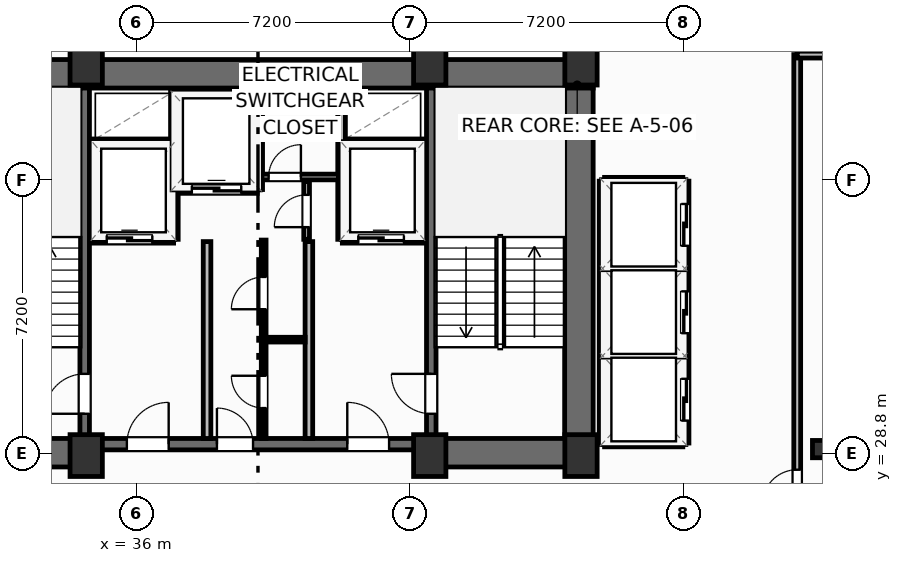
"""IFC4 building model, lengths in metres.
Left out: names, types, materials, properties, quantities, classifications, styles, units other than length and angle.
Written with IfcOpenShell. Run it as: python <this file> out.ifc"""

import sys

from ifc_helpers import new_model, si_unit, direction, frame, frame_2d, origin, origin_2d, place, context, subcontext, project, spatial, rectangle, i_section, extrude, element, fill, save


model = new_model("IFC4")
c1 = context("Model", 3, precision=1e-05, world=origin(), true_north=direction((0.0, 1.0)))
c2 = subcontext(c1, "Body", "Model", "MODEL_VIEW")
j1 = project(units=[si_unit("LENGTHUNIT", "METRE"), si_unit("PLANEANGLEUNIT", "RADIAN")], contexts=[c1])
p1 = place(None, origin())
s1 = spatial("IfcSite", under=j1, at=p1, CompositionType="ELEMENT")
p2 = place(p1, origin())
s2 = spatial("IfcBuilding", under=s1, at=p2, CompositionType="ELEMENT")
p3 = place(p2, frame((0.0, 0.0, 151.3)))
s3 = spatial("IfcBuildingStorey", under=s2, at=p3, CompositionType="ELEMENT", Elevation=151.3)
for number, where, z_axis, x_axis in (
    (1, (34.68, 28.75, 0.0), (0.0, 0.0, 1.0), (1.0, 0.0, 0.0)),
    (2, (43.72, 28.75, 0.0), (0.0, 0.0, 1.0), (1.0, 0.0, 0.0)),
    (3, (47.7, 28.75, 0.0), (0.0, 0.0, 1.0), (1.0, 0.0, 0.0)),
    (4, (34.68, 39.05, 0.0), (0.0, 0.0, 1.0), (1.0, 0.0, 0.0)),
    (5, (43.72, 39.05, 0.0), (0.0, 0.0, 1.0), (1.0, 0.0, 0.0)),
    (6, (47.7, 39.05, 0.0), (0.0, 0.0, 1.0), (1.0, 0.0, 0.0)),
):
    element("IfcColumn", number, at=place(p3, frame(where, z_axis=z_axis, x_axis=x_axis)), inside=s3, PredefinedType="COLUMN", context=c2, shape_type="SweptSolid", body=[
        extrude(rectangle(XDim=0.85, YDim=1.1, at=origin_2d()), origin(), (0.0, 0.0, 1.0), 3.7),
    ])
p4 = place(p3, frame((54.0, 28.92, 0.0), z_axis=(0.0, 0.0, 1.0), x_axis=(1.0, 0.0, 0.0)))
e7 = element("IfcColumn", 7, at=p4, inside=s3, PredefinedType="COLUMN", context=c2, shape_type="SweptSolid", body=[
    extrude(i_section(OverallWidth=0.418, OverallDepth=0.455, WebThickness=0.042, FlangeThickness=0.068, FilletRadius=0.025, at=origin_2d()), origin(), (0.0, 0.0, 1.0), 3.7),
])
p5 = place(p3, frame((30.38, 38.795, 0.0), z_axis=(0.0, 0.0, 1.0), x_axis=(1.0, 0.0, 0.0)))
e8 = element("IfcWall", 8, at=p5, inside=s3, PredefinedType="SHEAR", context=c2, shape_type="SweptSolid", body=[
    extrude(rectangle(XDim=17.64, YDim=0.75, at=frame_2d((8.82, 0.0))), origin(), (0.0, 0.0, 1.0), 3.45),
])
p6 = place(p3, frame((47.645, 29.2, 0.0), z_axis=(0.0, 0.0, 1.0), x_axis=(0.0, 1.0, 0.0)))
e9 = element("IfcWall", 9, at=p6, inside=s3, PredefinedType="SHEAR", context=c2, shape_type="SweptSolid", body=[
    extrude(rectangle(XDim=9.22, YDim=0.75, at=frame_2d((4.61, 0.0))), origin(), (0.0, 0.0, 1.0), 3.45),
])
p7 = place(p3, frame((30.38, 28.825, 0.0), z_axis=(0.0, 0.0, 1.0), x_axis=(1.0, 0.0, 0.0)))
e10 = element("IfcWall", 10, at=p7, inside=s3, PredefinedType="SHEAR", context=c2, shape_type="SweptSolid", body=[
    extrude(rectangle(XDim=4.42, YDim=0.75, at=frame_2d((2.21, 0.0))), origin(), (0.0, 0.0, 1.0), 3.45),
])
p8 = place(p3, frame((43.6, 28.825, 0.0), z_axis=(0.0, 0.0, 1.0), x_axis=(1.0, 0.0, 0.0)))
e11 = element("IfcWall", 11, at=p8, inside=s3, PredefinedType="SHEAR", context=c2, shape_type="SweptSolid", body=[
    extrude(rectangle(XDim=4.42, YDim=0.75, at=frame_2d((2.21, 0.0))), origin(), (0.0, 0.0, 1.0), 3.45),
])
p9 = place(p3, frame((34.8, 29.05, 0.0), z_axis=(0.0, 0.0, 1.0), x_axis=(1.0, 0.0, 0.0)))
e12 = element("IfcWall", 12, at=p9, inside=s3, PredefinedType="SHEAR", context=c2, shape_type="SweptSolid", body=[
    extrude(rectangle(XDim=8.8, YDim=0.3, at=frame_2d((4.4, 0.0))), origin(), (0.0, 0.0, 1.0), 3.45),
])
p10 = place(p9, frame((0.95, 0.0, 0.0)))
e13 = element("IfcOpeningElement", 13, at=p10, cuts=e12, PredefinedType="OPENING", context=c2, shape_type="SweptSolid", body=[
    extrude(rectangle(XDim=1.1, YDim=2.15, at=frame_2d((0.55, 1.075))), frame((0.0, 0.16, 0.0), z_axis=(0.0, -1.0, 0.0), x_axis=(1.0, 0.0, 0.0)), (0.0, 0.0, 1.0), 0.32),
])
p11 = place(p9, frame((6.75, 0.0, 0.0)))
e14 = element("IfcOpeningElement", 14, at=p11, cuts=e12, PredefinedType="OPENING", context=c2, shape_type="SweptSolid", body=[
    extrude(rectangle(XDim=1.1, YDim=2.15, at=frame_2d((0.55, 1.075))), frame((0.0, 0.16, 0.0), z_axis=(0.0, -1.0, 0.0), x_axis=(1.0, 0.0, 0.0)), (0.0, 0.0, 1.0), 0.32),
])
p12 = place(p9, frame((3.32, 0.0, 0.0)))
e15 = element("IfcOpeningElement", 15, at=p12, cuts=e12, PredefinedType="OPENING", context=c2, shape_type="SweptSolid", body=[
    extrude(rectangle(XDim=0.95, YDim=2.15, at=frame_2d((0.475, 1.075))), frame((0.0, 0.16, 0.0), z_axis=(0.0, -1.0, 0.0), x_axis=(1.0, 0.0, 0.0)), (0.0, 0.0, 1.0), 0.32),
])
p13 = place(p3, frame((34.64, 29.2, 0.0), z_axis=(0.0, 0.0, 1.0), x_axis=(0.0, 1.0, 0.0)))
e16 = element("IfcWall", 16, at=p13, inside=s3, PredefinedType="SHEAR", context=c2, shape_type="SweptSolid", body=[
    extrude(rectangle(XDim=9.22, YDim=0.25, at=frame_2d((4.61, 0.0))), origin(), (0.0, 0.0, 1.0), 3.45),
])
p14 = place(p13, frame((0.65, 0.0, 0.0)))
e17 = element("IfcOpeningElement", 17, at=p14, cuts=e16, PredefinedType="OPENING", context=c2, shape_type="SweptSolid", body=[
    extrude(rectangle(XDim=1.05, YDim=2.15, at=frame_2d((0.525, 1.075))), frame((0.0, 0.135, 0.0), z_axis=(0.0, -1.0, 0.0), x_axis=(1.0, 0.0, 0.0)), (0.0, 0.0, 1.0), 0.27),
])
p15 = place(p3, frame((43.76, 29.2, 0.0), z_axis=(0.0, 0.0, 1.0), x_axis=(0.0, 1.0, 0.0)))
e18 = element("IfcWall", 18, at=p15, inside=s3, PredefinedType="SHEAR", context=c2, shape_type="SweptSolid", body=[
    extrude(rectangle(XDim=9.22, YDim=0.25, at=frame_2d((4.61, 0.0))), origin(), (0.0, 0.0, 1.0), 3.45),
])
p16 = place(p15, frame((0.65, 0.0, 0.0)))
e19 = element("IfcOpeningElement", 19, at=p16, cuts=e18, PredefinedType="OPENING", context=c2, shape_type="SweptSolid", body=[
    extrude(rectangle(XDim=1.05, YDim=2.15, at=frame_2d((0.525, 1.075))), frame((0.0, 0.135, 0.0), z_axis=(0.0, -1.0, 0.0), x_axis=(1.0, 0.0, 0.0)), (0.0, 0.0, 1.0), 0.27),
])
p17 = place(p3, frame((53.45, 39.3, 0.0), z_axis=(0.0, 0.0, 1.0), x_axis=(0.0, 1.0, 0.0)))
e20 = element("IfcWall", 20, at=p17, inside=s3, PredefinedType="PARTITIONING", context=c2, shape_type="SweptSolid", body=[
    extrude(rectangle(XDim=2.31, YDim=0.125, at=frame_2d((1.155, 0.0))), origin(), (0.0, 0.0, 1.0), 3.45),
])
p18 = place(p3, frame((53.39, 26.84, 0.0), z_axis=(0.0, 0.0, 1.0), x_axis=(0.0, 1.0, 0.0)))
e21 = element("IfcWall", 21, at=p18, inside=s3, PredefinedType="PARTITIONING", context=c2, shape_type="SweptSolid", body=[
    extrude(rectangle(XDim=12.46, YDim=0.18, at=frame_2d((6.23, 0.0))), origin(), (0.0, 0.0, 1.0), 3.45),
])
p19 = place(p18, frame((0.618, 0.0, 0.0)))
e22 = element("IfcOpeningElement", 22, at=p19, cuts=e21, PredefinedType="OPENING", context=c2, shape_type="SweptSolid", body=[
    extrude(rectangle(XDim=0.92, YDim=2.05, at=frame_2d((0.46, 1.025))), frame((0.0, 0.1, 0.0), z_axis=(0.0, -1.0, 0.0), x_axis=(1.0, 0.0, 0.0)), (0.0, 0.0, 1.0), 0.2),
])
p20 = place(p3, frame((53.39, 39.3, 0.0), z_axis=(0.0, 0.0, 1.0), x_axis=(1.0, 0.0, 0.0)))
e23 = element("IfcWall", 23, at=p20, inside=s3, PredefinedType="PARTITIONING", context=c2, shape_type="SweptSolid", body=[
    extrude(rectangle(XDim=24.74, YDim=0.18, at=frame_2d((12.37, 0.0))), origin(), (0.0, 0.0, 1.0), 3.45),
])
for number, where, z_axis, x_axis in (
    (24, (37.86, 29.2, 0.0), (0.0, 0.0, 1.0), (0.0, 1.0, 0.0)),
    (25, (40.54, 29.2, 0.0), (0.0, 0.0, 1.0), (0.0, 1.0, 0.0)),
):
    element("IfcWall", number, at=place(p3, frame(where, z_axis=z_axis, x_axis=x_axis)), inside=s3, PredefinedType="PARTITIONING", context=c2, shape_type="SweptSolid", body=[
        extrude(rectangle(XDim=5.18, YDim=0.2, at=frame_2d((2.59, 0.0))), origin(), (0.0, 0.0, 1.0), 3.45),
    ])
p21 = place(p3, frame((34.8, 34.44, 0.0), z_axis=(0.0, 0.0, 1.0), x_axis=(1.0, 0.0, 0.0)))
e26 = element("IfcWall", 26, at=p21, inside=s3, PredefinedType="PARTITIONING", context=c2, shape_type="SweptSolid", body=[
    extrude(rectangle(XDim=2.18, YDim=0.2, at=frame_2d((1.09, 0.0))), origin(), (0.0, 0.0, 1.0), 3.45),
])
p22 = place(p21, frame((0.42, 0.0, 0.0)))
e27 = element("IfcOpeningElement", 27, at=p22, cuts=e26, PredefinedType="OPENING", context=c2, shape_type="SweptSolid", body=[
    extrude(rectangle(XDim=1.2, YDim=2.2, at=frame_2d((0.6, 1.1))), frame((0.0, 0.11, 0.0), z_axis=(0.0, -1.0, 0.0), x_axis=(1.0, 0.0, 0.0)), (0.0, 0.0, 1.0), 0.22),
])
p23 = place(p3, frame((34.8, 36.98, 0.0), z_axis=(0.0, 0.0, 1.0), x_axis=(1.0, 0.0, 0.0)))
e28 = element("IfcWall", 28, at=p23, inside=s3, PredefinedType="PARTITIONING", context=c2, shape_type="SweptSolid", body=[
    extrude(rectangle(XDim=2.18, YDim=0.2, at=frame_2d((1.09, 0.0))), origin(), (0.0, 0.0, 1.0), 3.45),
])
p24 = place(p3, frame((37.0, 34.44, 0.0), z_axis=(0.0, 0.0, 1.0), x_axis=(0.0, 1.0, 0.0)))
e29 = element("IfcWall", 29, at=p24, inside=s3, PredefinedType="PARTITIONING", context=c2, shape_type="SweptSolid", body=[
    extrude(rectangle(XDim=3.9, YDim=0.2, at=frame_2d((1.95, 0.0))), origin(), (0.0, 0.0, 1.0), 3.45),
])
p25 = place(p3, frame((41.42, 34.44, 0.0), z_axis=(0.0, 0.0, 1.0), x_axis=(1.0, 0.0, 0.0)))
e30 = element("IfcWall", 30, at=p25, inside=s3, PredefinedType="PARTITIONING", context=c2, shape_type="SweptSolid", body=[
    extrude(rectangle(XDim=2.18, YDim=0.2, at=frame_2d((1.09, 0.0))), origin(), (0.0, 0.0, 1.0), 3.45),
])
p26 = place(p25, frame((0.42, 0.0, 0.0)))
e31 = element("IfcOpeningElement", 31, at=p26, cuts=e30, PredefinedType="OPENING", context=c2, shape_type="SweptSolid", body=[
    extrude(rectangle(XDim=1.2, YDim=2.2, at=frame_2d((0.6, 1.1))), frame((0.0, 0.11, 0.0), z_axis=(0.0, -1.0, 0.0), x_axis=(1.0, 0.0, 0.0)), (0.0, 0.0, 1.0), 0.22),
])
p27 = place(p3, frame((41.42, 36.98, 0.0), z_axis=(0.0, 0.0, 1.0), x_axis=(1.0, 0.0, 0.0)))
e32 = element("IfcWall", 32, at=p27, inside=s3, PredefinedType="PARTITIONING", context=c2, shape_type="SweptSolid", body=[
    extrude(rectangle(XDim=2.18, YDim=0.2, at=frame_2d((1.09, 0.0))), origin(), (0.0, 0.0, 1.0), 3.45),
])
p28 = place(p3, frame((41.4, 34.44, 0.0), z_axis=(0.0, 0.0, 1.0), x_axis=(0.0, 1.0, 0.0)))
e33 = element("IfcWall", 33, at=p28, inside=s3, PredefinedType="PARTITIONING", context=c2, shape_type="SweptSolid", body=[
    extrude(rectangle(XDim=3.9, YDim=0.2, at=frame_2d((1.95, 0.0))), origin(), (0.0, 0.0, 1.0), 3.45),
])
p29 = place(p3, frame((37.06, 35.75, 0.0), z_axis=(0.0, 0.0, 1.0), x_axis=(1.0, 0.0, 0.0)))
e34 = element("IfcWall", 34, at=p29, inside=s3, PredefinedType="PARTITIONING", context=c2, shape_type="SweptSolid", body=[
    extrude(rectangle(XDim=2.12, YDim=0.2, at=frame_2d((1.06, 0.0))), origin(), (0.0, 0.0, 1.0), 3.45),
])
p30 = place(p29, frame((0.4, 0.0, 0.0)))
e35 = element("IfcOpeningElement", 35, at=p30, cuts=e34, PredefinedType="OPENING", context=c2, shape_type="SweptSolid", body=[
    extrude(rectangle(XDim=1.3, YDim=2.2, at=frame_2d((0.65, 1.1))), frame((0.0, 0.11, 0.0), z_axis=(0.0, -1.0, 0.0), x_axis=(1.0, 0.0, 0.0)), (0.0, 0.0, 1.0), 0.22),
])
p31 = place(p3, frame((39.22, 35.75, 0.0), z_axis=(0.0, 0.0, 1.0), x_axis=(0.0, 1.0, 0.0)))
e36 = element("IfcWall", 36, at=p31, inside=s3, PredefinedType="PARTITIONING", context=c2, shape_type="SweptSolid", body=[
    extrude(rectangle(XDim=2.59, YDim=0.2, at=frame_2d((1.295, 0.0))), origin(), (0.0, 0.0, 1.0), 3.45),
])
p32 = place(p3, frame((39.3, 36.08, 0.0), z_axis=(0.0, 0.0, 1.0), x_axis=(1.0, 0.0, 0.0)))
e37 = element("IfcWall", 37, at=p32, inside=s3, PredefinedType="PARTITIONING", context=c2, shape_type="SweptSolid", body=[
    extrude(rectangle(XDim=2.02, YDim=0.15, at=frame_2d((1.01, 0.0))), origin(), (0.0, 0.0, 1.0), 3.45),
])
p33 = place(p32, frame((0.18, 0.0, 0.0)))
e38 = element("IfcOpeningElement", 38, at=p33, cuts=e37, PredefinedType="OPENING", context=c2, shape_type="SweptSolid", body=[
    extrude(rectangle(XDim=0.85, YDim=2.05, at=frame_2d((0.425, 1.025))), frame((0.0, 0.085, 0.0), z_axis=(0.0, -1.0, 0.0), x_axis=(1.0, 0.0, 0.0)), (0.0, 0.0, 1.0), 0.17),
])
p34 = place(p3, frame((40.48, 34.44, 0.0), z_axis=(0.0, 0.0, 1.0), x_axis=(0.0, 1.0, 0.0)))
e39 = element("IfcWall", 39, at=p34, inside=s3, PredefinedType="PARTITIONING", context=c2, shape_type="SweptSolid", body=[
    extrude(rectangle(XDim=1.52, YDim=0.15, at=frame_2d((0.76, 0.0))), origin(), (0.0, 0.0, 1.0), 3.45),
])
p35 = place(p34, frame((0.32, 0.0, 0.0)))
e40 = element("IfcOpeningElement", 40, at=p35, cuts=e39, PredefinedType="OPENING", context=c2, shape_type="SweptSolid", body=[
    extrude(rectangle(XDim=0.85, YDim=2.05, at=frame_2d((0.425, 1.025))), frame((0.0, 0.085, 0.0), z_axis=(0.0, -1.0, 0.0), x_axis=(1.0, 0.0, 0.0)), (0.0, 0.0, 1.0), 0.17),
])
p36 = place(p3, frame((39.35, 31.8, 0.0), z_axis=(0.0, 0.0, 1.0), x_axis=(1.0, 0.0, 0.0)))
e41 = element("IfcWall", 41, at=p36, inside=s3, PredefinedType="PARTITIONING", context=c2, shape_type="SweptSolid", body=[
    extrude(rectangle(XDim=1.09, YDim=0.125, at=frame_2d((0.545, 0.0))), origin(), (0.0, 0.0, 1.0), 3.45),
])
p37 = place(p3, frame((39.35, 29.2, 0.0), z_axis=(0.0, 0.0, 1.0), x_axis=(0.0, 1.0, 0.0)))
e42 = element("IfcWall", 42, at=p37, inside=s3, PredefinedType="PARTITIONING", context=c2, shape_type="SweptSolid", body=[
    extrude(rectangle(XDim=5.22, YDim=0.125, at=frame_2d((2.61, 0.0))), origin(), (0.0, 0.0, 1.0), 3.45),
])
p38 = place(p37, frame((0.8, 0.0, 0.0)))
e43 = element("IfcOpeningElement", 43, at=p38, cuts=e42, PredefinedType="OPENING", context=c2, shape_type="SweptSolid", body=[
    extrude(rectangle(XDim=0.85, YDim=2.05, at=frame_2d((0.425, 1.025))), frame((0.0, 0.073, 0.0), z_axis=(0.0, -1.0, 0.0), x_axis=(1.0, 0.0, 0.0)), (0.0, 0.0, 1.0), 0.145),
])
p39 = place(p37, frame((3.4, 0.0, 0.0)))
e44 = element("IfcOpeningElement", 44, at=p39, cuts=e42, PredefinedType="OPENING", context=c2, shape_type="SweptSolid", body=[
    extrude(rectangle(XDim=0.85, YDim=2.05, at=frame_2d((0.425, 1.025))), frame((0.0, 0.073, 0.0), z_axis=(0.0, -1.0, 0.0), x_axis=(1.0, 0.0, 0.0)), (0.0, 0.0, 1.0), 0.145),
])
for number, where, z_axis, x_axis in (
    (45, (48.32, 31.375, 0.0), (0.0, 0.0, 1.0), (1.0, 0.0, 0.0)),
    (46, (48.32, 33.675, 0.0), (0.0, 0.0, 1.0), (1.0, 0.0, 0.0)),
):
    element("IfcWall", number, at=place(p3, frame(where, z_axis=z_axis, x_axis=x_axis)), inside=s3, PredefinedType="PARTITIONING", context=c2, shape_type="SweptSolid", body=[
        extrude(rectangle(XDim=2.06, YDim=0.2, at=frame_2d((1.03, 0.0))), origin(), (0.0, 0.0, 1.0), 3.45),
    ])
p40 = place(p3, frame((48.32, 29.08, 0.0), z_axis=(0.0, 0.0, 1.0), x_axis=(1.0, 0.0, 0.0)))
e47 = element("IfcWall", 47, at=p40, inside=s3, PredefinedType="PARTITIONING", context=c2, shape_type="SweptSolid", body=[
    extrude(rectangle(XDim=2.06, YDim=0.2, at=frame_2d((1.03, 0.0))), origin(), (0.0, 0.0, 1.0), 2.662),
])
p41 = place(p3, frame((48.32, 35.97, 0.0), z_axis=(0.0, 0.0, 1.0), x_axis=(1.0, 0.0, 0.0)))
e48 = element("IfcWall", 48, at=p41, inside=s3, PredefinedType="PARTITIONING", context=c2, shape_type="SweptSolid", body=[
    extrude(rectangle(XDim=2.06, YDim=0.2, at=frame_2d((1.03, 0.0))), origin(), (0.0, 0.0, 1.0), 3.45),
])
p42 = place(p3, frame((48.28, 29.08, 0.0), z_axis=(0.0, 0.0, 1.0), x_axis=(0.0, 1.0, 0.0)))
e49 = element("IfcWall", 49, at=p42, inside=s3, PredefinedType="PARTITIONING", context=c2, shape_type="SweptSolid", body=[
    extrude(rectangle(XDim=6.89, YDim=0.2, at=frame_2d((3.445, 0.0))), origin(), (0.0, 0.0, 1.0), 3.45),
])
p43 = place(p3, frame((50.44, 29.08, 0.0), z_axis=(0.0, 0.0, 1.0), x_axis=(0.0, 1.0, 0.0)))
e50 = element("IfcWall", 50, at=p43, inside=s3, PredefinedType="PARTITIONING", context=c2, shape_type="SweptSolid", body=[
    extrude(rectangle(XDim=6.89, YDim=0.2, at=frame_2d((3.445, 0.0))), origin(), (0.0, 0.0, 1.0), 3.45),
])
p44 = place(p43, frame((0.59, 0.0, 0.0)))
e51 = element("IfcOpeningElement", 51, at=p44, cuts=e50, PredefinedType="OPENING", context=c2, shape_type="SweptSolid", body=[
    extrude(rectangle(XDim=1.1, YDim=2.15, at=frame_2d((0.55, 1.075))), frame((0.0, 0.11, 0.0), z_axis=(0.0, -1.0, 0.0), x_axis=(1.0, 0.0, 0.0)), (0.0, 0.0, 1.0), 0.22),
])
p45 = place(p43, frame((2.89, 0.0, 0.0)))
e52 = element("IfcOpeningElement", 52, at=p45, cuts=e50, PredefinedType="OPENING", context=c2, shape_type="SweptSolid", body=[
    extrude(rectangle(XDim=1.1, YDim=2.15, at=frame_2d((0.55, 1.075))), frame((0.0, 0.11, 0.0), z_axis=(0.0, -1.0, 0.0), x_axis=(1.0, 0.0, 0.0)), (0.0, 0.0, 1.0), 0.22),
])
p46 = place(p43, frame((5.19, 0.0, 0.0)))
e53 = element("IfcOpeningElement", 53, at=p46, cuts=e50, PredefinedType="OPENING", context=c2, shape_type="SweptSolid", body=[
    extrude(rectangle(XDim=1.1, YDim=2.15, at=frame_2d((0.55, 1.075))), frame((0.0, 0.11, 0.0), z_axis=(0.0, -1.0, 0.0), x_axis=(1.0, 0.0, 0.0)), (0.0, 0.0, 1.0), 0.22),
])
p47 = place(p19, origin())
e54 = element("IfcDoor", 54, at=p47, inside=s3, OperationType="SINGLE_SWING_LEFT", PredefinedType="DOOR", context=c2, shape_type="SweptSolid", body=[
    extrude(rectangle(XDim=0.92, YDim=2.05, at=frame_2d((0.46, 1.025))), frame((0.0, 0.025, 0.0), z_axis=(0.0, -1.0, 0.0), x_axis=(1.0, 0.0, 0.0)), (0.0, 0.0, 1.0), 0.05),
])
fill(e22, e54)
p48 = place(p14, origin())
e55 = element("IfcDoor", 55, at=p48, inside=s3, OperationType="SINGLE_SWING_LEFT", PredefinedType="DOOR", context=c2, shape_type="SweptSolid", body=[
    extrude(rectangle(XDim=1.05, YDim=2.15, at=frame_2d((0.525, 1.075))), frame((0.0, 0.025, 0.0), z_axis=(0.0, -1.0, 0.0), x_axis=(1.0, 0.0, 0.0)), (0.0, 0.0, 1.0), 0.05),
])
fill(e17, e55)
p49 = place(p16, origin())
e56 = element("IfcDoor", 56, at=p49, inside=s3, OperationType="SINGLE_SWING_RIGHT", PredefinedType="DOOR", context=c2, shape_type="SweptSolid", body=[
    extrude(rectangle(XDim=1.05, YDim=2.15, at=frame_2d((0.525, 1.075))), frame((0.0, 0.025, 0.0), z_axis=(0.0, -1.0, 0.0), x_axis=(1.0, 0.0, 0.0)), (0.0, 0.0, 1.0), 0.05),
])
fill(e19, e56)
p50 = place(p10, origin())
e57 = element("IfcDoor", 57, at=p50, inside=s3, OperationType="SINGLE_SWING_RIGHT", PredefinedType="DOOR", context=c2, shape_type="SweptSolid", body=[
    extrude(rectangle(XDim=1.1, YDim=2.15, at=frame_2d((0.55, 1.075))), frame((0.0, 0.025, 0.0), z_axis=(0.0, -1.0, 0.0), x_axis=(1.0, 0.0, 0.0)), (0.0, 0.0, 1.0), 0.05),
])
fill(e13, e57)
p51 = place(p11, origin())
e58 = element("IfcDoor", 58, at=p51, inside=s3, OperationType="SINGLE_SWING_LEFT", PredefinedType="DOOR", context=c2, shape_type="SweptSolid", body=[
    extrude(rectangle(XDim=1.1, YDim=2.15, at=frame_2d((0.55, 1.075))), frame((0.0, 0.025, 0.0), z_axis=(0.0, -1.0, 0.0), x_axis=(1.0, 0.0, 0.0)), (0.0, 0.0, 1.0), 0.05),
])
fill(e14, e58)
p52 = place(p22, origin())
e59 = element("IfcDoor", 59, at=p52, inside=s3, OperationType="SLIDING_TO_LEFT", PredefinedType="DOOR", context=c2, shape_type="SweptSolid", body=[
    extrude(rectangle(XDim=1.2, YDim=2.2, at=frame_2d((0.6, 1.1))), frame((0.0, 0.025, 0.0), z_axis=(0.0, -1.0, 0.0), x_axis=(1.0, 0.0, 0.0)), (0.0, 0.0, 1.0), 0.05),
])
fill(e27, e59)
p53 = place(p26, origin())
e60 = element("IfcDoor", 60, at=p53, inside=s3, OperationType="SLIDING_TO_LEFT", PredefinedType="DOOR", context=c2, shape_type="SweptSolid", body=[
    extrude(rectangle(XDim=1.2, YDim=2.2, at=frame_2d((0.6, 1.1))), frame((0.0, 0.025, 0.0), z_axis=(0.0, -1.0, 0.0), x_axis=(1.0, 0.0, 0.0)), (0.0, 0.0, 1.0), 0.05),
])
fill(e31, e60)
p54 = place(p30, origin())
e61 = element("IfcDoor", 61, at=p54, inside=s3, OperationType="SLIDING_TO_LEFT", PredefinedType="DOOR", context=c2, shape_type="SweptSolid", body=[
    extrude(rectangle(XDim=1.3, YDim=2.2, at=frame_2d((0.65, 1.1))), frame((0.0, 0.025, 0.0), z_axis=(0.0, -1.0, 0.0), x_axis=(1.0, 0.0, 0.0)), (0.0, 0.0, 1.0), 0.05),
])
fill(e35, e61)
p55 = place(p33, origin())
e62 = element("IfcDoor", 62, at=p55, inside=s3, OperationType="SINGLE_SWING_RIGHT", PredefinedType="DOOR", context=c2, shape_type="SweptSolid", body=[
    extrude(rectangle(XDim=0.85, YDim=2.05, at=frame_2d((0.425, 1.025))), frame((0.0, 0.025, 0.0), z_axis=(0.0, -1.0, 0.0), x_axis=(1.0, 0.0, 0.0)), (0.0, 0.0, 1.0), 0.05),
])
fill(e38, e62)
p56 = place(p35, origin())
e63 = element("IfcDoor", 63, at=p56, inside=s3, OperationType="SINGLE_SWING_LEFT", PredefinedType="DOOR", context=c2, shape_type="SweptSolid", body=[
    extrude(rectangle(XDim=0.85, YDim=2.05, at=frame_2d((0.425, 1.025))), frame((0.0, 0.025, 0.0), z_axis=(0.0, -1.0, 0.0), x_axis=(1.0, 0.0, 0.0)), (0.0, 0.0, 1.0), 0.05),
])
fill(e40, e63)
p57 = place(p38, origin())
e64 = element("IfcDoor", 64, at=p57, inside=s3, OperationType="SINGLE_SWING_RIGHT", PredefinedType="DOOR", context=c2, shape_type="SweptSolid", body=[
    extrude(rectangle(XDim=0.85, YDim=2.05, at=frame_2d((0.425, 1.025))), frame((0.0, 0.025, 0.0), z_axis=(0.0, -1.0, 0.0), x_axis=(1.0, 0.0, 0.0)), (0.0, 0.0, 1.0), 0.05),
])
fill(e43, e64)
p58 = place(p39, origin())
e65 = element("IfcDoor", 65, at=p58, inside=s3, OperationType="SINGLE_SWING_LEFT", PredefinedType="DOOR", context=c2, shape_type="SweptSolid", body=[
    extrude(rectangle(XDim=0.85, YDim=2.05, at=frame_2d((0.425, 1.025))), frame((0.0, 0.025, 0.0), z_axis=(0.0, -1.0, 0.0), x_axis=(1.0, 0.0, 0.0)), (0.0, 0.0, 1.0), 0.05),
])
fill(e44, e65)
p59 = place(p12, origin())
e66 = element("IfcDoor", 66, at=p59, inside=s3, OperationType="SINGLE_SWING_LEFT", PredefinedType="DOOR", context=c2, shape_type="SweptSolid", body=[
    extrude(rectangle(XDim=0.95, YDim=2.15, at=frame_2d((0.475, 1.075))), frame((0.0, 0.025, 0.0), z_axis=(0.0, -1.0, 0.0), x_axis=(1.0, 0.0, 0.0)), (0.0, 0.0, 1.0), 0.05),
])
fill(e15, e66)
p60 = place(p44, origin())
e67 = element("IfcDoor", 67, at=p60, inside=s3, OperationType="SLIDING_TO_LEFT", PredefinedType="DOOR", context=c2, shape_type="SweptSolid", body=[
    extrude(rectangle(XDim=1.1, YDim=2.15, at=frame_2d((0.55, 1.075))), frame((0.0, 0.025, 0.0), z_axis=(0.0, -1.0, 0.0), x_axis=(1.0, 0.0, 0.0)), (0.0, 0.0, 1.0), 0.05),
])
fill(e51, e67)
p61 = place(p45, origin())
e68 = element("IfcDoor", 68, at=p61, inside=s3, OperationType="SLIDING_TO_LEFT", PredefinedType="DOOR", context=c2, shape_type="SweptSolid", body=[
    extrude(rectangle(XDim=1.1, YDim=2.15, at=frame_2d((0.55, 1.075))), frame((0.0, 0.025, 0.0), z_axis=(0.0, -1.0, 0.0), x_axis=(1.0, 0.0, 0.0)), (0.0, 0.0, 1.0), 0.05),
])
fill(e52, e68)
p62 = place(p46, origin())
e69 = element("IfcDoor", 69, at=p62, inside=s3, OperationType="SLIDING_TO_LEFT", PredefinedType="DOOR", context=c2, shape_type="SweptSolid", body=[
    extrude(rectangle(XDim=1.1, YDim=2.15, at=frame_2d((0.55, 1.075))), frame((0.0, 0.025, 0.0), z_axis=(0.0, -1.0, 0.0), x_axis=(1.0, 0.0, 0.0)), (0.0, 0.0, 1.0), 0.05),
])
fill(e53, e69)
save(model, sys.argv[1])
